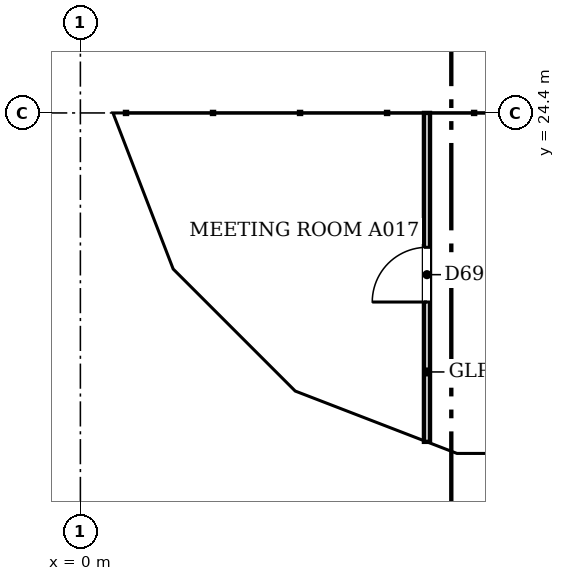
"""IFC4 building model, lengths in metres.
Left out: names, types, materials, properties, quantities, classifications, styles, units other than length and angle.
Written with IfcOpenShell. Run it as: python <this file> out.ifc"""

import sys

from ifc_helpers import new_model, si_unit, direction, frame, frame_2d, origin, place, context, subcontext, project, spatial, polyline, rectangle, outline, extrude, faceted_brep, source, transform, mapped, element, fill, save


model = new_model("IFC4")
c1 = context("Model", 3, precision=1e-05, world=origin(), true_north=direction((0.0, 1.0)))
c2 = subcontext(c1, "Body", "Model", "MODEL_VIEW")
j1 = project(units=[si_unit("LENGTHUNIT", "METRE"), si_unit("PLANEANGLEUNIT", "RADIAN")], contexts=[c1])
p1 = place(None, origin())
s1 = spatial("IfcSite", under=j1, at=p1, CompositionType="ELEMENT")
p2 = place(p1, origin())
s2 = spatial("IfcBuilding", under=s1, at=p2, CompositionType="ELEMENT")
p3 = place(p2, frame((0.0, 0.0, 143.0)))
s3 = spatial("IfcBuildingStorey", under=s2, at=p3, CompositionType="ELEMENT", Elevation=143.0)
m1 = source(origin(), c2, "Body", "Brep", [
    faceted_brep([(3.05, -0.25, 0.0), (6.053, -0.25, 3.8), (3.05, -0.25, 7.6), (0.0, -0.25, 3.8), (0.0, 0.25, 3.8), (3.05, 0.25, 7.6), (6.007, 0.25, 3.859), (6.007, 0.25, 3.741), (3.05, 0.25, 0.0), (6.053, 0.0, 3.8)], [[[0, 1, 2, 3]], [[4, 5, 6, 7, 8]], [[8, 7, 9, 1, 0]], [[6, 5, 2, 1, 9]], [[5, 4, 3, 2]], [[4, 8, 0, 3]], [[9, 7, 6]]]),
])
p4 = place(p3, frame((0.25, 30.5, -3.8), z_axis=(0.0, 0.0, 1.0), x_axis=(0.0, -1.0, 0.0)))
e1 = element("IfcWall", 1, at=p4, inside=s3, PredefinedType="SOLIDWALL", context=c2, shape_type="MappedRepresentation", body=[
    mapped(m1, transform((0.0, 0.0, 0.0), scale=1.0)),
])
m2 = source(origin(), c2, "Body", "SweptSolid", [
    extrude(outline(polyline([(3.049, 0.401), (5.735, 3.8), (3.049, 7.199), (0.321, 3.8), (3.049, 0.401)])), frame((0.0, 0.26, 0.0), z_axis=(0.0, -1.0, 0.0), x_axis=(1.0, 0.0, 0.0)), (0.0, 0.0, 1.0), 0.52),
])
p5 = place(p4, origin())
e2 = element("IfcOpeningElement", 2, at=p5, cuts=e1, PredefinedType="OPENING", context=c2, shape_type="MappedRepresentation", body=[
    mapped(m2, transform((0.0, 0.0, 0.0), scale=1.0)),
])
m3 = source(origin(), c2, "Body", "Brep", [
    faceted_brep([(2.95, -0.25, 0.0), (3.003, -0.25, 0.068), (3.003, -0.25, 7.532), (2.95, -0.25, 7.6), (0.0, -0.25, 3.8), (0.047, 0.25, 3.86), (2.898, 0.25, 7.532), (2.898, 0.25, 0.068), (0.047, 0.25, 3.74), (2.95, 0.0, 0.0), (2.95, 0.0, 7.6), (0.0, 0.0, 3.8)], [[[0, 1, 2, 3, 4]], [[5, 6, 7, 8]], [[1, 0, 9]], [[10, 3, 2]], [[6, 5, 11, 4, 3, 10]], [[8, 7, 9, 0, 4, 11]], [[8, 11, 5]], [[1, 9, 7, 6, 10, 2]]]),
])
p6 = place(p3, frame((0.25, 24.447, -3.8), z_axis=(0.0, 0.0, 1.0), x_axis=(0.35992665181, -0.932980602862, 0.0)))
e3 = element("IfcWall", 3, at=p6, inside=s3, PredefinedType="SOLIDWALL", context=c2, shape_type="MappedRepresentation", body=[
    mapped(m3, transform((0.0, 0.0, 0.0), scale=1.0)),
])
m4 = source(origin(), c2, "Body", "SweptSolid", [
    extrude(outline(polyline([(2.75, 6.935), (0.316, 3.8), (2.75, 0.665), (2.75, 6.935)])), frame((0.0, 0.26, 0.0), z_axis=(0.0, -1.0, 0.0), x_axis=(1.0, 0.0, 0.0)), (0.0, 0.0, 1.0), 0.52),
])
p7 = place(p6, origin())
e4 = element("IfcOpeningElement", 4, at=p7, cuts=e3, PredefinedType="OPENING", context=c2, shape_type="MappedRepresentation", body=[
    mapped(m4, transform((0.0, 0.0, 0.0), scale=1.0)),
])
m5 = source(origin(), c2, "Body", "Brep", [
    faceted_brep([(0.053, -0.25, 0.0), (2.997, -0.25, 3.8), (0.053, -0.25, 7.6), (0.0, -0.25, 7.532), (0.0, -0.25, 0.068), (0.106, 0.25, 7.532), (2.944, 0.25, 3.868), (2.944, 0.25, 3.732), (0.106, 0.25, 0.068), (2.997, 0.0, 3.8), (0.053, 0.0, 0.0), (0.053, 0.0, 7.6)], [[[0, 1, 2, 3, 4]], [[5, 6, 7, 8]], [[8, 7, 9, 1, 0, 10]], [[6, 5, 11, 2, 1, 9]], [[3, 2, 11]], [[10, 0, 4]], [[8, 10, 4, 3, 11, 5]], [[9, 7, 6]]]),
])
p8 = place(p3, frame((1.274, 21.731, -3.8), z_axis=(0.0, 0.0, 1.0), x_axis=(0.707147509625, -0.707066050402, 0.0)))
e5 = element("IfcWall", 5, at=p8, inside=s3, PredefinedType="SOLIDWALL", context=c2, shape_type="MappedRepresentation", body=[
    mapped(m5, transform((0.0, 0.0, 0.0), scale=1.0)),
])
m6 = source(origin(), c2, "Body", "SweptSolid", [
    extrude(outline(polyline([(0.253, 0.666), (2.681, 3.8), (0.253, 6.934), (0.253, 0.666)])), frame((0.0, 0.26, 0.0), z_axis=(0.0, -1.0, 0.0), x_axis=(1.0, 0.0, 0.0)), (0.0, 0.0, 1.0), 0.52),
])
p9 = place(p8, origin())
e6 = element("IfcOpeningElement", 6, at=p9, cuts=e5, PredefinedType="OPENING", context=c2, shape_type="MappedRepresentation", body=[
    mapped(m6, transform((0.0, 0.0, 0.0), scale=1.0)),
])
m7 = source(origin(), c2, "Body", "Brep", [
    faceted_brep([(2.95, -0.25, 0.0), (2.997, -0.25, 0.059), (2.997, -0.25, 7.541), (2.95, -0.25, 7.6), (0.0, -0.25, 3.8), (0.053, 0.25, 3.868), (2.904, 0.25, 7.54), (2.904, 0.25, 0.06), (0.053, 0.25, 3.732), (2.95, 0.0, 0.0), (2.95, 0.0, 7.6), (0.0, 0.0, 3.8)], [[[0, 1, 2, 3, 4]], [[5, 6, 7, 8]], [[1, 0, 9]], [[10, 3, 2]], [[6, 5, 11, 4, 3, 10]], [[8, 7, 9, 0, 4, 11]], [[8, 11, 5]], [[1, 9, 7, 6, 10, 2]]]),
])
p10 = place(p3, frame((3.394, 19.612, -3.8), z_axis=(0.0, 0.0, 1.0), x_axis=(0.932990326376, -0.359901446078, 0.0)))
e7 = element("IfcWall", 7, at=p10, inside=s3, PredefinedType="SOLIDWALL", context=c2, shape_type="MappedRepresentation", body=[
    mapped(m7, transform((0.0, 0.0, 0.0), scale=1.0)),
])
p11 = place(p10, origin())
e8 = element("IfcOpeningElement", 8, at=p11, cuts=e7, PredefinedType="OPENING", context=c2, shape_type="MappedRepresentation", body=[
    mapped(m4, transform((0.0, 0.0, 0.0), scale=1.0)),
])
m8 = source(origin(), c2, "Body", "Brep", [
    faceted_brep([(0.047, -0.25, 0.0), (3.05, -0.25, 3.8), (0.047, -0.25, 7.6), (0.0, -0.25, 7.54), (0.0, -0.25, 0.06), (0.093, 0.25, 7.541), (3.05, 0.25, 3.8), (0.093, 0.25, 0.059), (0.047, 0.0, 0.0), (0.047, 0.0, 7.6)], [[[0, 1, 2, 3, 4]], [[5, 6, 7]], [[7, 6, 1, 0, 8]], [[6, 5, 9, 2, 1]], [[3, 2, 9]], [[8, 0, 4]], [[7, 8, 4, 3, 9, 5]]]),
])
p12 = place(p3, frame((6.1, 18.55, -3.8), z_axis=(0.0, 0.0, 1.0), x_axis=(1.0, 0.0, 0.0)))
e9 = element("IfcWall", 9, at=p12, inside=s3, PredefinedType="SOLIDWALL", context=c2, shape_type="MappedRepresentation", body=[
    mapped(m8, transform((0.0, 0.0, 0.0), scale=1.0)),
])
m9 = source(origin(), c2, "Body", "SweptSolid", [
    extrude(outline(polyline([(0.247, 0.656), (2.731, 3.8), (0.247, 6.944), (0.247, 0.656)])), frame((0.0, 0.26, 0.0), z_axis=(0.0, -1.0, 0.0), x_axis=(1.0, 0.0, 0.0)), (0.0, 0.0, 1.0), 0.52),
])
p13 = place(p12, origin())
e10 = element("IfcOpeningElement", 10, at=p13, cuts=e9, PredefinedType="OPENING", context=c2, shape_type="MappedRepresentation", body=[
    mapped(m9, transform((0.0, 0.0, 0.0), scale=1.0)),
])
p14 = place(p2, frame((0.0, 0.0, 146.8)))
s4 = spatial("IfcBuildingStorey", under=s2, at=p14, CompositionType="ELEMENT", Elevation=146.8)
m10 = source(origin(), c2, "Body", "Brep", [
    faceted_brep([(3.003, -0.25, 0.0), (3.05, -0.25, 0.06), (3.05, -0.25, 7.54), (3.003, -0.25, 7.6), (0.0, -0.25, 3.8), (0.0, 0.25, 3.8), (2.957, 0.25, 7.541), (2.957, 0.25, 0.059), (3.003, 0.0, 0.0), (3.003, 0.0, 7.6)], [[[0, 1, 2, 3, 4]], [[5, 6, 7]], [[1, 0, 8]], [[9, 3, 2]], [[6, 5, 4, 3, 9]], [[5, 7, 8, 0, 4]], [[1, 8, 7, 6, 9, 2]]]),
])
p15 = place(p14, frame((0.25, 27.45, -3.8), z_axis=(0.0, 0.0, 1.0), x_axis=(0.0, -1.0, 0.0)))
e11 = element("IfcWall", 11, at=p15, inside=s4, PredefinedType="SOLIDWALL", context=c2, shape_type="MappedRepresentation", body=[
    mapped(m10, transform((0.0, 0.0, 0.0), scale=1.0)),
])
m11 = source(origin(), c2, "Body", "SweptSolid", [
    extrude(outline(polyline([(2.803, 6.944), (0.319, 3.8), (2.803, 0.656), (2.803, 6.944)])), frame((0.0, 0.26, 0.0), z_axis=(0.0, -1.0, 0.0), x_axis=(1.0, 0.0, 0.0)), (0.0, 0.0, 1.0), 0.52),
])
p16 = place(p15, origin())
e12 = element("IfcOpeningElement", 12, at=p16, cuts=e11, PredefinedType="OPENING", context=c2, shape_type="MappedRepresentation", body=[
    mapped(m11, transform((0.0, 0.0, 0.0), scale=1.0)),
])
m12 = source(origin(), c2, "Body", "Brep", [
    faceted_brep([(0.047, -0.25, 0.0), (2.997, -0.25, 3.8), (0.047, -0.25, 7.6), (0.0, -0.25, 7.541), (0.0, -0.25, 0.059), (0.093, 0.25, 7.54), (2.944, 0.25, 3.868), (2.944, 0.25, 3.732), (0.093, 0.25, 0.06), (2.997, 0.0, 3.8), (0.047, 0.0, 0.0), (0.047, 0.0, 7.6)], [[[0, 1, 2, 3, 4]], [[5, 6, 7, 8]], [[8, 7, 9, 1, 0, 10]], [[6, 5, 11, 2, 1, 9]], [[3, 2, 11]], [[10, 0, 4]], [[8, 10, 4, 3, 11, 5]], [[9, 7, 6]]]),
])
p17 = place(p14, frame((0.233, 24.49, -3.8), z_axis=(0.0, 0.0, 1.0), x_axis=(0.359901446078, -0.932990326376, 0.0)))
e13 = element("IfcWall", 13, at=p17, inside=s4, PredefinedType="SOLIDWALL", context=c2, shape_type="MappedRepresentation", body=[
    mapped(m12, transform((0.0, 0.0, 0.0), scale=1.0)),
])
m13 = source(origin(), c2, "Body", "SweptSolid", [
    extrude(outline(polyline([(0.247, 0.665), (2.681, 3.8), (0.247, 6.935), (0.247, 0.665)])), frame((0.0, 0.26, 0.0), z_axis=(0.0, -1.0, 0.0), x_axis=(1.0, 0.0, 0.0)), (0.0, 0.0, 1.0), 0.52),
])
p18 = place(p17, origin())
e14 = element("IfcOpeningElement", 14, at=p18, cuts=e13, PredefinedType="OPENING", context=c2, shape_type="MappedRepresentation", body=[
    mapped(m13, transform((0.0, 0.0, 0.0), scale=1.0)),
])
m14 = source(origin(), c2, "Body", "Brep", [
    faceted_brep([(2.944, -0.25, 0.0), (2.997, -0.25, 0.068), (2.997, -0.25, 7.532), (2.944, -0.25, 7.6), (0.0, -0.25, 3.8), (0.053, 0.25, 3.868), (2.891, 0.25, 7.532), (2.891, 0.25, 0.068), (0.053, 0.25, 3.732), (2.944, 0.0, 0.0), (2.944, 0.0, 7.6), (0.0, 0.0, 3.8)], [[[0, 1, 2, 3, 4]], [[5, 6, 7, 8]], [[1, 0, 9]], [[10, 3, 2]], [[6, 5, 11, 4, 3, 10]], [[8, 7, 9, 0, 4, 11]], [[8, 11, 5]], [[1, 9, 7, 6, 10, 2]]]),
])
p19 = place(p14, frame((1.312, 21.694, -3.8), z_axis=(0.0, 0.0, 1.0), x_axis=(0.707066050402, -0.707147509625, 0.0)))
e15 = element("IfcWall", 15, at=p19, inside=s4, PredefinedType="SOLIDWALL", context=c2, shape_type="MappedRepresentation", body=[
    mapped(m14, transform((0.0, 0.0, 0.0), scale=1.0)),
])
m15 = source(origin(), c2, "Body", "SweptSolid", [
    extrude(outline(polyline([(2.744, 6.934), (0.316, 3.8), (2.744, 0.666), (2.744, 6.934)])), frame((0.0, 0.26, 0.0), z_axis=(0.0, -1.0, 0.0), x_axis=(1.0, 0.0, 0.0)), (0.0, 0.0, 1.0), 0.52),
])
p20 = place(p19, origin())
e16 = element("IfcOpeningElement", 16, at=p20, cuts=e15, PredefinedType="OPENING", context=c2, shape_type="MappedRepresentation", body=[
    mapped(m15, transform((0.0, 0.0, 0.0), scale=1.0)),
])
m16 = source(origin(), c2, "Body", "Brep", [
    faceted_brep([(0.053, -0.25, 0.0), (3.003, -0.25, 3.8), (0.053, -0.25, 7.6), (0.0, -0.25, 7.532), (0.0, -0.25, 0.068), (0.106, 0.25, 7.532), (2.957, 0.25, 3.86), (2.957, 0.25, 3.74), (0.106, 0.25, 0.068), (3.003, 0.0, 3.8), (0.053, 0.0, 0.0), (0.053, 0.0, 7.6)], [[[0, 1, 2, 3, 4]], [[5, 6, 7, 8]], [[8, 7, 9, 1, 0, 10]], [[6, 5, 11, 2, 1, 9]], [[3, 2, 11]], [[10, 0, 4]], [[8, 10, 4, 3, 11, 5]], [[9, 7, 6]]]),
])
p21 = place(p14, frame((3.344, 19.631, -3.8), z_axis=(0.0, 0.0, 1.0), x_axis=(0.933007896601, -0.359855894603, 0.0)))
e17 = element("IfcWall", 17, at=p21, inside=s4, PredefinedType="SOLIDWALL", context=c2, shape_type="MappedRepresentation", body=[
    mapped(m16, transform((0.0, 0.0, 0.0), scale=1.0)),
])
m17 = source(origin(), c2, "Body", "SweptSolid", [
    extrude(outline(polyline([(0.253, 0.665), (2.687, 3.8), (0.253, 6.935), (0.253, 0.665)])), frame((0.0, 0.26, 0.0), z_axis=(0.0, -1.0, 0.0), x_axis=(1.0, 0.0, 0.0)), (0.0, 0.0, 1.0), 0.52),
])
p22 = place(p21, origin())
e18 = element("IfcOpeningElement", 18, at=p22, cuts=e17, PredefinedType="OPENING", context=c2, shape_type="MappedRepresentation", body=[
    mapped(m17, transform((0.0, 0.0, 0.0), scale=1.0)),
])
m18 = source(origin(), c2, "Body", "Brep", [
    faceted_brep([(3.003, -0.25, 0.0), (6.053, -0.25, 3.8), (3.003, -0.25, 7.6), (0.0, -0.25, 3.8), (0.047, 0.25, 3.859), (3.003, 0.25, 7.6), (6.053, 0.25, 3.8), (3.003, 0.25, 0.0), (0.047, 0.25, 3.741), (0.0, 0.0, 3.8)], [[[0, 1, 2, 3]], [[4, 5, 6, 7, 8]], [[7, 6, 1, 0]], [[6, 5, 2, 1]], [[5, 4, 9, 3, 2]], [[8, 7, 0, 3, 9]], [[8, 9, 4]]]),
])
p23 = place(p14, frame((6.146, 18.55, -3.8), z_axis=(0.0, 0.0, 1.0), x_axis=(1.0, 0.0, 0.0)))
e19 = element("IfcWall", 19, at=p23, inside=s4, PredefinedType="SOLIDWALL", context=c2, shape_type="MappedRepresentation", body=[
    mapped(m18, transform((0.0, 0.0, 0.0), scale=1.0)),
])
m19 = source(origin(), c2, "Body", "SweptSolid", [
    extrude(outline(polyline([(3.005, 0.401), (5.733, 3.8), (3.005, 7.199), (0.319, 3.8), (3.005, 0.401)])), frame((0.0, 0.26, 0.0), z_axis=(0.0, -1.0, 0.0), x_axis=(1.0, 0.0, 0.0)), (0.0, 0.0, 1.0), 0.52),
])
p24 = place(p23, origin())
e20 = element("IfcOpeningElement", 20, at=p24, cuts=e19, PredefinedType="OPENING", context=c2, shape_type="MappedRepresentation", body=[
    mapped(m19, transform((0.0, 0.0, 0.0), scale=1.0)),
])
p25 = place(p3, frame((5.7, 18.99, 0.0), z_axis=(0.0, 0.0, 1.0), x_axis=(0.0, 1.0, 0.0)))
e21 = element("IfcWall", 21, at=p25, inside=s3, PredefinedType="PARTITIONING", context=c2, shape_type="SweptSolid", body=[
    extrude(rectangle(XDim=5.41, YDim=0.1, at=frame_2d((2.705, 0.0))), origin(), (0.0, 0.0, 1.0), 3.067),
])
m20 = source(origin(), c2, "Body", "SweptSolid", [
    extrude(rectangle(XDim=0.9, YDim=2.1, at=frame_2d((0.45, 1.05))), frame((0.0, 0.06, 0.0), z_axis=(0.0, -1.0, 0.0), x_axis=(1.0, 0.0, 0.0)), (0.0, 0.0, 1.0), 0.12),
])
p26 = place(p25, frame((2.3, 0.0, 0.0)))
e22 = element("IfcOpeningElement", 22, at=p26, cuts=e21, PredefinedType="OPENING", context=c2, shape_type="MappedRepresentation", body=[
    mapped(m20, transform((0.0, 0.0, 0.0), scale=1.0)),
])
m21 = source(origin(), c2, "Body", "SweptSolid", [
    extrude(rectangle(XDim=0.9, YDim=2.1, at=frame_2d((0.45, 1.05))), frame((0.0, 0.025, 0.0), z_axis=(0.0, -1.0, 0.0), x_axis=(1.0, 0.0, 0.0)), (0.0, 0.0, 1.0), 0.05),
])
p27 = place(p26, origin())
e23 = element("IfcDoor", 23, at=p27, inside=s3, OperationType="SINGLE_SWING_LEFT", PredefinedType="DOOR", context=c2, shape_type="MappedRepresentation", body=[
    mapped(m21, transform((0.0, 0.0, 0.0), scale=1.0)),
])
fill(e22, e23)
save(model, sys.argv[1])
